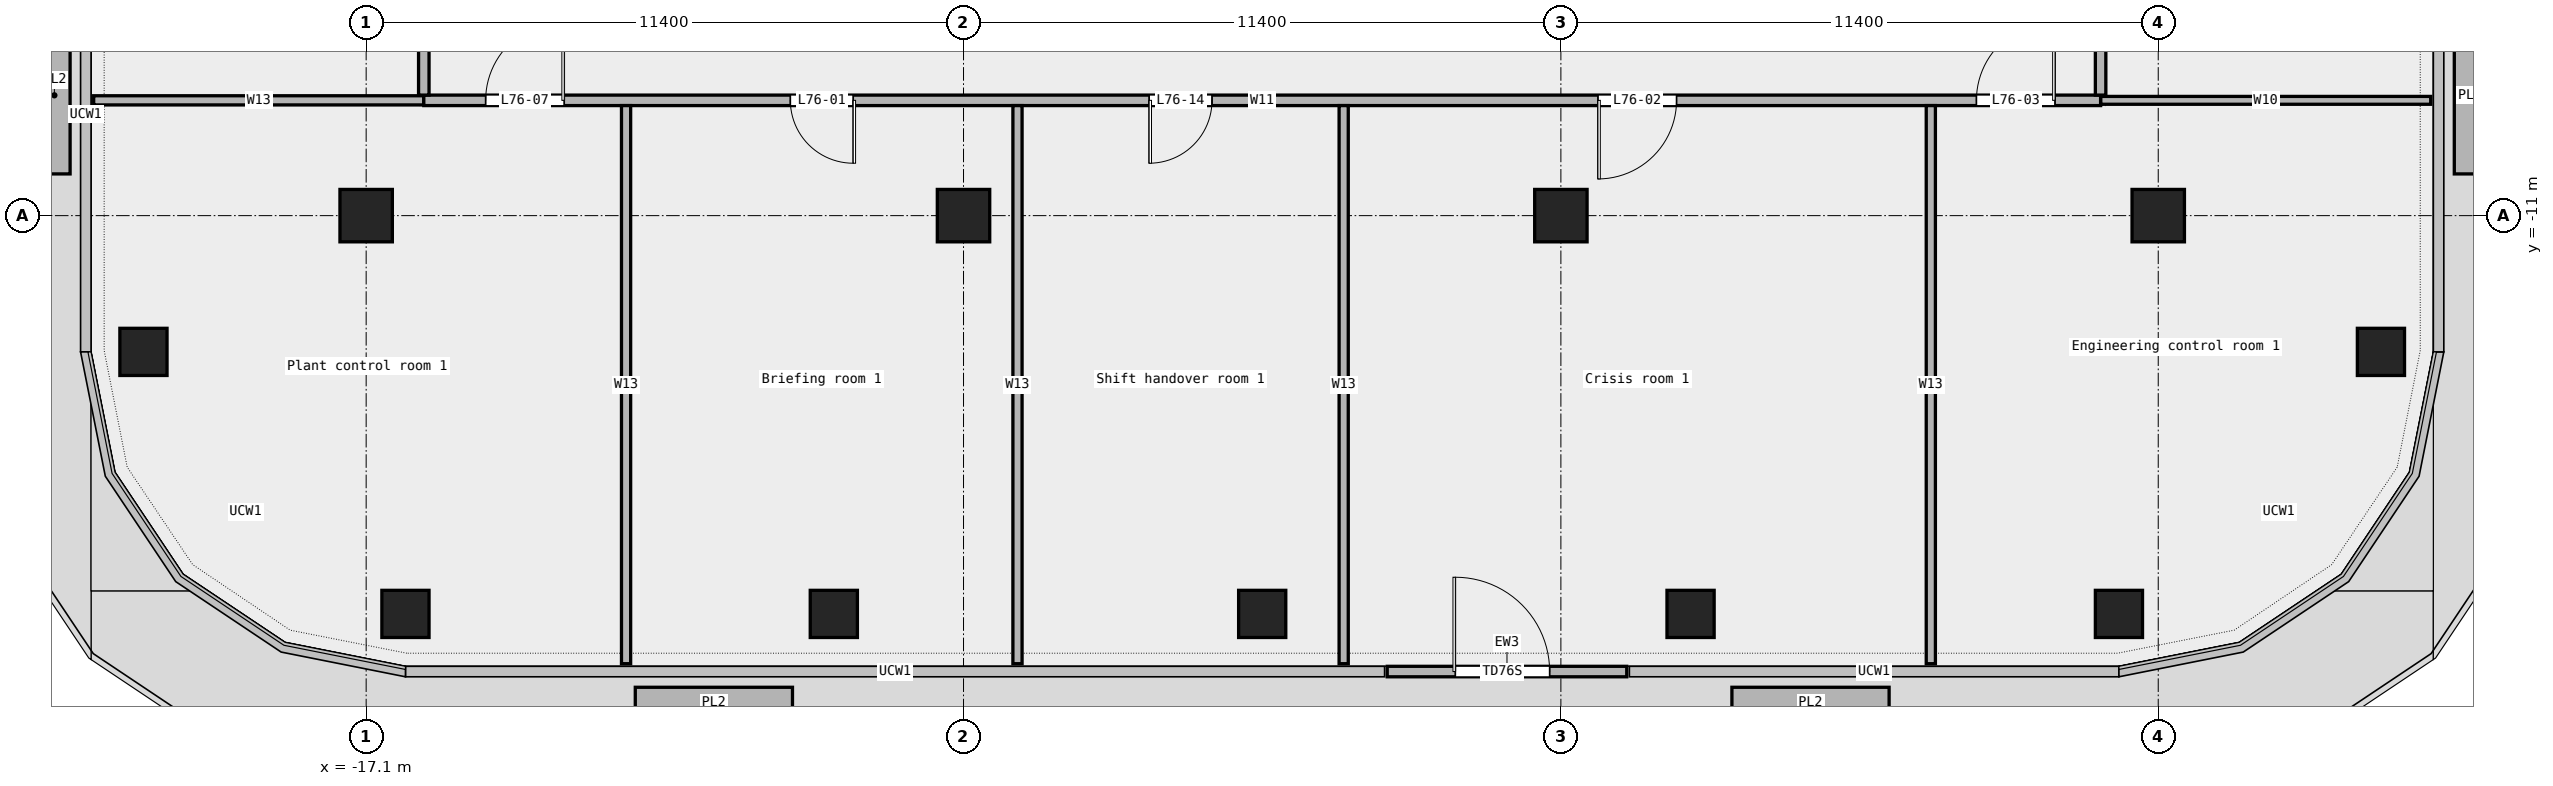
"""IFC4 building model, lengths in metres.
Left out: names, types, materials, properties, quantities, classifications, styles, units other than length and angle.
Written with IfcOpenShell. Run it as: python <this file> out.ifc"""

import sys

from ifc_helpers import new_model, si_unit, direction, frame, frame_2d, origin, origin_2d, place, context, subcontext, project, spatial, rectangle, extrude, element, fill, save


model = new_model("IFC4")
c1 = context("Model", 3, precision=1e-05, world=origin(), true_north=direction((0.0, 1.0)))
c2 = subcontext(c1, "Body", "Model", "MODEL_VIEW")
j1 = project(units=[si_unit("LENGTHUNIT", "METRE"), si_unit("PLANEANGLEUNIT", "RADIAN")], contexts=[c1])
p1 = place(None, origin())
s1 = spatial("IfcSite", under=j1, at=p1, CompositionType="ELEMENT")
p2 = place(p1, origin())
s2 = spatial("IfcBuilding", under=s1, at=p2, CompositionType="ELEMENT")
p3 = place(p2, frame((0.0, 0.0, 349.4)))
s3 = spatial("IfcBuildingStorey", under=s2, at=p3, CompositionType="ELEMENT", Elevation=349.4)
for number, where, z_axis, x_axis in (
    (1, (-16.35, -18.6, 0.0), (0.0, 0.0, 1.0), (1.0, 0.0, 0.0)),
    (2, (-8.175, -18.6, 0.0), (0.0, 0.0, 1.0), (1.0, 0.0, 0.0)),
    (3, (0.0, -18.6, 0.0), (0.0, 0.0, 1.0), (1.0, 0.0, 0.0)),
    (4, (8.175, -18.6, 0.0), (0.0, 0.0, 1.0), (1.0, 0.0, 0.0)),
    (5, (16.35, -18.6, 0.0), (0.0, 0.0, 1.0), (1.0, 0.0, 0.0)),
    (6, (21.35, -13.6, 0.0), (0.0, 0.0, 1.0), (1.0, 0.0, 0.0)),
    (7, (-21.35, -13.6, 0.0), (0.0, 0.0, 1.0), (1.0, 0.0, 0.0)),
):
    element("IfcColumn", number, at=place(p3, frame(where, z_axis=z_axis, x_axis=x_axis)), inside=s3, PredefinedType="COLUMN", context=c2, shape_type="SweptSolid", body=[
        extrude(rectangle(XDim=0.9, YDim=0.9, at=origin_2d()), origin(), (0.0, 0.0, 1.0), 3.65),
    ])
for number, where, z_axis, x_axis in (
    (8, (-17.1, -11.0, 0.0), (0.0, 0.0, 1.0), (1.0, 0.0, 0.0)),
    (9, (-5.7, -11.0, 0.0), (0.0, 0.0, 1.0), (1.0, 0.0, 0.0)),
    (10, (5.7, -11.0, 0.0), (0.0, 0.0, 1.0), (1.0, 0.0, 0.0)),
    (11, (17.1, -11.0, 0.0), (0.0, 0.0, 1.0), (1.0, 0.0, 0.0)),
):
    element("IfcColumn", number, at=place(p3, frame(where, z_axis=z_axis, x_axis=x_axis)), inside=s3, PredefinedType="COLUMN", context=c2, shape_type="SweptSolid", body=[
        extrude(rectangle(XDim=1.0, YDim=1.0, at=origin_2d()), origin(), (0.0, 0.0, 1.0), 3.65),
    ])
p4 = place(p3, frame((2.386, -19.7, 0.0), z_axis=(0.0, 0.0, 1.0), x_axis=(1.0, 0.0, 0.0)))
e12 = element("IfcWall", 12, at=p4, inside=s3, PredefinedType="STANDARD", context=c2, shape_type="SweptSolid", body=[
    extrude(rectangle(XDim=4.571, YDim=0.2, at=frame_2d((2.286, 0.0))), origin(), (0.0, 0.0, 1.0), 3.65),
])
p5 = place(p4, frame((1.3, 0.0, 0.0)))
e13 = element("IfcOpeningElement", 13, at=p5, cuts=e12, PredefinedType="OPENING", context=c2, shape_type="SweptSolid", body=[
    extrude(rectangle(XDim=1.8, YDim=2.4, at=frame_2d((0.9, 1.2))), frame((0.0, 0.112, 0.0), z_axis=(0.0, -1.0, 0.0), x_axis=(1.0, 0.0, 0.0)), (0.0, 0.0, 1.0), 0.224),
])
for number, where, z_axis, x_axis in (
    (14, (-11.964, -20.3, 0.0), (0.0, 0.0, 1.0), (1.0, 0.0, 0.0)),
    (15, (8.964, -20.3, 0.0), (0.0, 0.0, 1.0), (1.0, 0.0, 0.0)),
    (16, (23.05, -10.204, 0.0), (0.0, 0.0, 1.0), (0.0, 1.0, 0.0)),
    (17, (-23.05, -7.204, 0.0), (0.0, 0.0, 1.0), (0.0, -1.0, 0.0)),
):
    element("IfcWall", number, at=place(p3, frame(where, z_axis=z_axis, x_axis=x_axis)), inside=s3, PredefinedType="STANDARD", context=c2, shape_type="SweptSolid", body=[
        extrude(rectangle(XDim=3.0, YDim=0.6, at=frame_2d((1.5, 0.0))), origin(), (0.0, 0.0, 1.0), 0.7),
    ])
p6 = place(p3, frame((16.0, -8.8, 0.0), z_axis=(0.0, 0.0, 1.0), x_axis=(1.0, 0.0, 0.0)))
e18 = element("IfcWall", 18, at=p6, inside=s3, PredefinedType="PARTITIONING", context=c2, shape_type="SweptSolid", body=[
    extrude(rectangle(XDim=6.3, YDim=0.15, at=frame_2d((3.15, 0.0))), origin(), (0.0, 0.0, 1.0), 3.65),
])
p7 = place(p3, frame((-22.3, -8.8, 0.0), z_axis=(0.0, 0.0, 1.0), x_axis=(1.0, 0.0, 0.0)))
e19 = element("IfcWall", 19, at=p7, inside=s3, PredefinedType="PARTITIONING", context=c2, shape_type="SweptSolid", body=[
    extrude(rectangle(XDim=6.3, YDim=0.175, at=frame_2d((3.15, 0.0))), origin(), (0.0, 0.0, 1.0), 3.65),
])
p8 = place(p3, frame((-16.0, -8.8, 0.0), z_axis=(0.0, 0.0, 1.0), x_axis=(1.0, 0.0, 0.0)))
e20 = element("IfcWall", 20, at=p8, inside=s3, PredefinedType="PARTITIONING", context=c2, shape_type="SweptSolid", body=[
    extrude(rectangle(XDim=32.0, YDim=0.2, at=frame_2d((16.0, 0.0))), origin(), (0.0, 0.0, 1.0), 3.65),
])
p9 = place(p8, frame((6.995, 0.0, 0.0)))
e21 = element("IfcOpeningElement", 21, at=p9, cuts=e20, PredefinedType="OPENING", context=c2, shape_type="SweptSolid", body=[
    extrude(rectangle(XDim=1.2, YDim=2.1, at=frame_2d((0.6, 1.05))), frame((0.0, 0.112, 0.0), z_axis=(0.0, -1.0, 0.0), x_axis=(1.0, 0.0, 0.0)), (0.0, 0.0, 1.0), 0.224),
])
p10 = place(p8, frame((22.407, 0.0, 0.0)))
e22 = element("IfcOpeningElement", 22, at=p10, cuts=e20, PredefinedType="OPENING", context=c2, shape_type="SweptSolid", body=[
    extrude(rectangle(XDim=1.5, YDim=2.1, at=frame_2d((0.75, 1.05))), frame((0.0, 0.112, 0.0), z_axis=(0.0, -1.0, 0.0), x_axis=(1.0, 0.0, 0.0)), (0.0, 0.0, 1.0), 0.224),
])
p11 = place(p8, frame((29.63, 0.0, 0.0)))
e23 = element("IfcOpeningElement", 23, at=p11, cuts=e20, PredefinedType="OPENING", context=c2, shape_type="SweptSolid", body=[
    extrude(rectangle(XDim=1.5, YDim=2.1, at=frame_2d((0.75, 1.05))), frame((0.0, 0.112, 0.0), z_axis=(0.0, -1.0, 0.0), x_axis=(1.0, 0.0, 0.0)), (0.0, 0.0, 1.0), 0.224),
])
p12 = place(p8, frame((1.18, 0.0, 0.0)))
e24 = element("IfcOpeningElement", 24, at=p12, cuts=e20, PredefinedType="OPENING", context=c2, shape_type="SweptSolid", body=[
    extrude(rectangle(XDim=1.5, YDim=2.1, at=frame_2d((0.75, 1.05))), frame((0.0, 0.112, 0.0), z_axis=(0.0, -1.0, 0.0), x_axis=(1.0, 0.0, 0.0)), (0.0, 0.0, 1.0), 0.224),
])
p13 = place(p8, frame((13.843, 0.0, 0.0)))
e25 = element("IfcOpeningElement", 25, at=p13, cuts=e20, PredefinedType="OPENING", context=c2, shape_type="SweptSolid", body=[
    extrude(rectangle(XDim=1.2, YDim=2.1, at=frame_2d((0.6, 1.05))), frame((0.0, 0.112, 0.0), z_axis=(0.0, -1.0, 0.0), x_axis=(1.0, 0.0, 0.0)), (0.0, 0.0, 1.0), 0.224),
])
p14 = place(p3, frame((-16.0, -8.7, 0.0), z_axis=(0.0, 0.0, 1.0), x_axis=(0.0, 1.0, 0.0)))
e26 = element("IfcWall", 26, at=p14, inside=s3, PredefinedType="PARTITIONING", context=c2, shape_type="SweptSolid", body=[
    extrude(rectangle(XDim=23.7, YDim=0.2, at=frame_2d((11.85, 0.0))), origin(), (0.0, 0.0, 1.0), 3.65),
])
p15 = place(p14, frame((4.255, 0.0, 0.0)))
e27 = element("IfcOpeningElement", 27, at=p15, cuts=e26, PredefinedType="OPENING", context=c2, shape_type="SweptSolid", body=[
    extrude(rectangle(XDim=1.2, YDim=2.1, at=frame_2d((0.6, 1.05))), frame((0.0, 0.112, 0.0), z_axis=(0.0, -1.0, 0.0), x_axis=(1.0, 0.0, 0.0)), (0.0, 0.0, 1.0), 0.224),
])
p16 = place(p14, frame((20.265, 0.0, 0.0)))
e28 = element("IfcOpeningElement", 28, at=p16, cuts=e26, PredefinedType="OPENING", context=c2, shape_type="SweptSolid", body=[
    extrude(rectangle(XDim=1.0, YDim=2.1, at=frame_2d((0.5, 1.05))), frame((0.0, 0.112, 0.0), z_axis=(0.0, -1.0, 0.0), x_axis=(1.0, 0.0, 0.0)), (0.0, 0.0, 1.0), 0.224),
])
p17 = place(p14, frame((12.72, 0.0, 0.0)))
e29 = element("IfcOpeningElement", 29, at=p17, cuts=e26, PredefinedType="OPENING", context=c2, shape_type="SweptSolid", body=[
    extrude(rectangle(XDim=0.9, YDim=2.1, at=frame_2d((0.45, 1.05))), frame((0.0, 0.112, 0.0), z_axis=(0.0, -1.0, 0.0), x_axis=(1.0, 0.0, 0.0)), (0.0, 0.0, 1.0), 0.224),
])
for number, where, z_axis, x_axis in (
    (30, (-12.14, -19.55, 0.0), (0.0, 0.0, 1.0), (0.0, 1.0, 0.0)),
    (31, (-4.67, -19.55, 0.0), (0.0, 0.0, 1.0), (0.0, 1.0, 0.0)),
    (32, (1.555, -19.55, 0.0), (0.0, 0.0, 1.0), (0.0, 1.0, 0.0)),
    (33, (12.76, -19.55, 0.0), (0.0, 0.0, 1.0), (0.0, 1.0, 0.0)),
):
    element("IfcWall", number, at=place(p3, frame(where, z_axis=z_axis, x_axis=x_axis)), inside=s3, PredefinedType="PARTITIONING", context=c2, shape_type="SweptSolid", body=[
        extrude(rectangle(XDim=10.65, YDim=0.175, at=frame_2d((5.325, 0.0))), origin(), (0.0, 0.0, 1.0), 3.65),
    ])
p18 = place(p3, frame((16.0, -8.7, 0.0), z_axis=(0.0, 0.0, 1.0), x_axis=(0.0, 1.0, 0.0)))
e34 = element("IfcWall", 34, at=p18, inside=s3, PredefinedType="PARTITIONING", context=c2, shape_type="SweptSolid", body=[
    extrude(rectangle(XDim=23.7, YDim=0.2, at=frame_2d((11.85, 0.0))), origin(), (0.0, 0.0, 1.0), 3.65),
])
p19 = place(p18, frame((17.695, 0.0, 0.0)))
e35 = element("IfcOpeningElement", 35, at=p19, cuts=e34, PredefinedType="OPENING", context=c2, shape_type="SweptSolid", body=[
    extrude(rectangle(XDim=1.2, YDim=2.1, at=frame_2d((0.6, 1.05))), frame((0.0, 0.112, 0.0), z_axis=(0.0, -1.0, 0.0), x_axis=(1.0, 0.0, 0.0)), (0.0, 0.0, 1.0), 0.224),
])
p20 = place(p18, frame((9.383, 0.0, 0.0)))
e36 = element("IfcOpeningElement", 36, at=p20, cuts=e34, PredefinedType="OPENING", context=c2, shape_type="SweptSolid", body=[
    extrude(rectangle(XDim=1.2, YDim=2.1, at=frame_2d((0.6, 1.05))), frame((0.0, 0.112, 0.0), z_axis=(0.0, -1.0, 0.0), x_axis=(1.0, 0.0, 0.0)), (0.0, 0.0, 1.0), 0.224),
])
p21 = place(p18, frame((2.488, 0.0, 0.0)))
e37 = element("IfcOpeningElement", 37, at=p21, cuts=e34, PredefinedType="OPENING", context=c2, shape_type="SweptSolid", body=[
    extrude(rectangle(XDim=0.9, YDim=2.1, at=frame_2d((0.45, 1.05))), frame((0.0, 0.112, 0.0), z_axis=(0.0, -1.0, 0.0), x_axis=(1.0, 0.0, 0.0)), (0.0, 0.0, 1.0), 0.224),
])
p22 = place(p5, origin())
e38 = element("IfcDoor", 38, at=p22, inside=s3, OperationType="DOUBLE_DOOR_SINGLE_SWING", PredefinedType="DOOR", context=c2, shape_type="SweptSolid", body=[
    extrude(rectangle(XDim=1.8, YDim=2.4, at=frame_2d((0.9, 1.2))), frame((0.0, 0.025, 0.0), z_axis=(0.0, -1.0, 0.0), x_axis=(1.0, 0.0, 0.0)), (0.0, 0.0, 1.0), 0.05),
])
fill(e13, e38)
p23 = place(p9, origin())
e39 = element("IfcDoor", 39, at=p23, inside=s3, OperationType="SINGLE_SWING_LEFT", PredefinedType="DOOR", context=c2, shape_type="SweptSolid", body=[
    extrude(rectangle(XDim=1.2, YDim=2.1, at=frame_2d((0.6, 1.05))), frame((0.0, 0.025, 0.0), z_axis=(0.0, -1.0, 0.0), x_axis=(1.0, 0.0, 0.0)), (0.0, 0.0, 1.0), 0.05),
])
fill(e21, e39)
p24 = place(p10, origin())
e40 = element("IfcDoor", 40, at=p24, inside=s3, OperationType="DOUBLE_DOOR_SINGLE_SWING", PredefinedType="DOOR", context=c2, shape_type="SweptSolid", body=[
    extrude(rectangle(XDim=1.5, YDim=2.1, at=frame_2d((0.75, 1.05))), frame((0.0, 0.025, 0.0), z_axis=(0.0, -1.0, 0.0), x_axis=(1.0, 0.0, 0.0)), (0.0, 0.0, 1.0), 0.05),
])
fill(e22, e40)
p25 = place(p11, origin())
e41 = element("IfcDoor", 41, at=p25, inside=s3, OperationType="DOUBLE_DOOR_SINGLE_SWING", PredefinedType="DOOR", context=c2, shape_type="SweptSolid", body=[
    extrude(rectangle(XDim=1.5, YDim=2.1, at=frame_2d((0.75, 1.05))), frame((0.0, 0.025, 0.0), z_axis=(0.0, -1.0, 0.0), x_axis=(1.0, 0.0, 0.0)), (0.0, 0.0, 1.0), 0.05),
])
fill(e23, e41)
p26 = place(p12, origin())
e42 = element("IfcDoor", 42, at=p26, inside=s3, OperationType="DOUBLE_DOOR_SINGLE_SWING", PredefinedType="DOOR", context=c2, shape_type="SweptSolid", body=[
    extrude(rectangle(XDim=1.5, YDim=2.1, at=frame_2d((0.75, 1.05))), frame((0.0, 0.025, 0.0), z_axis=(0.0, -1.0, 0.0), x_axis=(1.0, 0.0, 0.0)), (0.0, 0.0, 1.0), 0.05),
])
fill(e24, e42)
p27 = place(p13, origin())
e43 = element("IfcDoor", 43, at=p27, inside=s3, OperationType="SINGLE_SWING_RIGHT", PredefinedType="DOOR", context=c2, shape_type="SweptSolid", body=[
    extrude(rectangle(XDim=1.2, YDim=2.1, at=frame_2d((0.6, 1.05))), frame((0.0, 0.025, 0.0), z_axis=(0.0, -1.0, 0.0), x_axis=(1.0, 0.0, 0.0)), (0.0, 0.0, 1.0), 0.05),
])
fill(e25, e43)
save(model, sys.argv[1])
